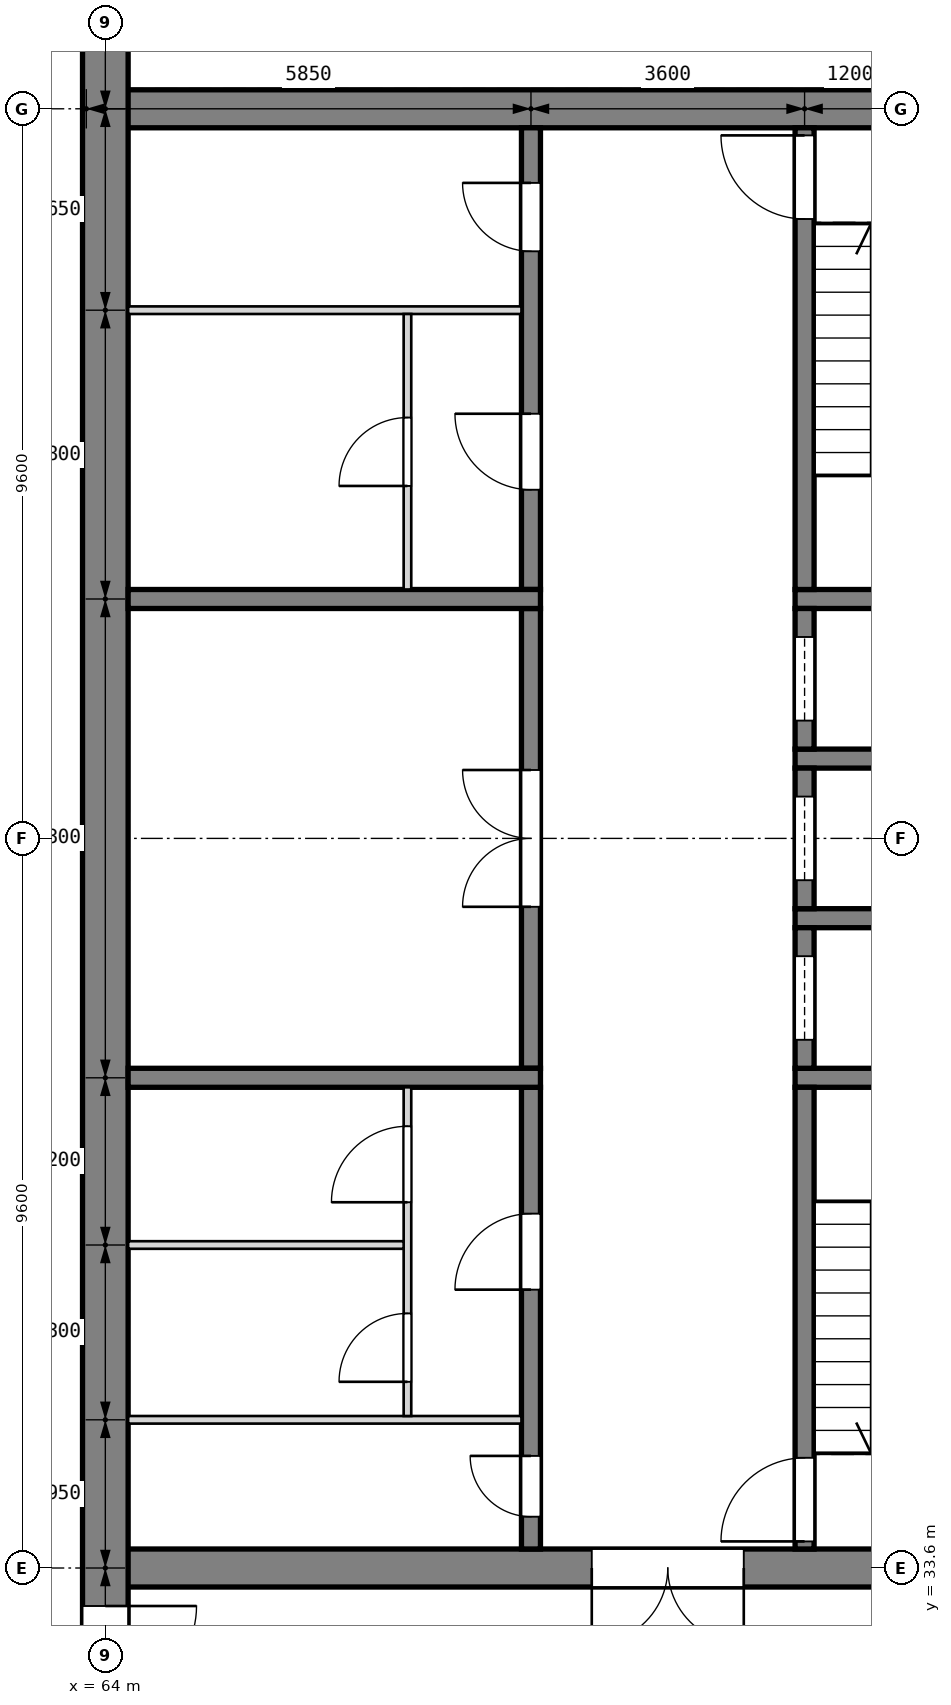
"""IFC4 building model, lengths in metres.
Left out: names, types, materials, properties, quantities, classifications, styles, units other than length and angle.
Written with IfcOpenShell. Run it as: python <this file> out.ifc"""

import sys

from ifc_helpers import new_model, si_unit, direction, frame, frame_2d, origin, place, context, subcontext, project, spatial, rectangle, extrude, element, fill, save


model = new_model("IFC4")
c1 = context("Model", 3, precision=1e-05, world=origin(), true_north=direction((0.0, 1.0)))
c2 = subcontext(c1, "Body", "Model", "MODEL_VIEW")
j1 = project(units=[si_unit("LENGTHUNIT", "METRE"), si_unit("PLANEANGLEUNIT", "RADIAN")], contexts=[c1])
p1 = place(None, origin())
s1 = spatial("IfcSite", under=j1, at=p1, CompositionType="ELEMENT")
p2 = place(p1, origin())
s2 = spatial("IfcBuilding", under=s1, at=p2, CompositionType="ELEMENT")
p3 = place(p2, origin())
s3 = spatial("IfcBuildingStorey", under=s2, at=p3, CompositionType="ELEMENT", Elevation=0.0)
p4 = place(p3, frame((63.75, 52.8, 0.0), z_axis=(0.0, 0.0, 1.0), x_axis=(1.0, 0.0, 0.0)))
e1 = element("IfcWall", 1, at=p4, inside=s3, PredefinedType="SHEAR", context=c2, shape_type="SweptSolid", body=[
    extrude(rectangle(XDim=13.3, YDim=0.5, at=frame_2d((6.65, 0.0))), origin(), (0.0, 0.0, 1.0), 4.2),
])
p5 = place(p4, frame((10.95, 0.0, 0.0)))
e2 = element("IfcOpeningElement", 2, at=p5, cuts=e1, PredefinedType="OPENING", context=c2, shape_type="SweptSolid", body=[
    extrude(rectangle(XDim=1.8, YDim=2.1, at=frame_2d((0.9, 1.05))), frame((0.0, 0.26, 0.0), z_axis=(0.0, -1.0, 0.0), x_axis=(1.0, 0.0, 0.0)), (0.0, 0.0, 1.0), 0.52),
])
p6 = place(p3, frame((63.75, 33.6, 0.0), z_axis=(0.0, 0.0, 1.0), x_axis=(1.0, 0.0, 0.0)))
e3 = element("IfcWall", 3, at=p6, inside=s3, PredefinedType="SHEAR", context=c2, shape_type="SweptSolid", body=[
    extrude(rectangle(XDim=13.3, YDim=0.5, at=frame_2d((6.65, 0.0))), origin(), (0.0, 0.0, 1.0), 4.2),
])
p7 = place(p6, frame((6.65, 0.0, 0.0)))
e4 = element("IfcOpeningElement", 4, at=p7, cuts=e3, PredefinedType="OPENING", context=c2, shape_type="SweptSolid", body=[
    extrude(rectangle(XDim=2.0, YDim=2.1, at=frame_2d((1.0, 1.05))), frame((0.0, 0.26, 0.0), z_axis=(0.0, -1.0, 0.0), x_axis=(1.0, 0.0, 0.0)), (0.0, 0.0, 1.0), 0.52),
])
p8 = place(p6, frame((10.95, 0.0, 0.0)))
e5 = element("IfcOpeningElement", 5, at=p8, cuts=e3, PredefinedType="OPENING", context=c2, shape_type="SweptSolid", body=[
    extrude(rectangle(XDim=1.8, YDim=2.1, at=frame_2d((0.9, 1.05))), frame((0.0, 0.26, 0.0), z_axis=(0.0, -1.0, 0.0), x_axis=(1.0, 0.0, 0.0)), (0.0, 0.0, 1.0), 0.52),
])
p9 = place(p3, frame((64.0, 28.8, 0.0), z_axis=(0.0, 0.0, 1.0), x_axis=(0.0, 1.0, 0.0)))
e6 = element("IfcWall", 6, at=p9, inside=s3, PredefinedType="SHEAR", context=c2, shape_type="SweptSolid", body=[
    extrude(rectangle(XDim=28.8, YDim=0.6, at=frame_2d((14.4, 0.0))), origin(), (0.0, 0.0, 1.0), 4.2),
])
p10 = place(p9, frame((0.5, 0.0, 0.0)))
e7 = element("IfcOpeningElement", 7, at=p10, cuts=e6, PredefinedType="OPENING", context=c2, shape_type="SweptSolid", body=[
    extrude(rectangle(XDim=1.2, YDim=2.1, at=frame_2d((0.6, 1.05))), frame((0.0, 0.31, 0.0), z_axis=(0.0, -1.0, 0.0), x_axis=(1.0, 0.0, 0.0)), (0.0, 0.0, 1.0), 0.62),
])
p11 = place(p9, frame((3.1, 0.0, 0.0)))
e8 = element("IfcOpeningElement", 8, at=p11, cuts=e6, PredefinedType="OPENING", context=c2, shape_type="SweptSolid", body=[
    extrude(rectangle(XDim=1.2, YDim=2.1, at=frame_2d((0.6, 1.05))), frame((0.0, 0.31, 0.0), z_axis=(0.0, -1.0, 0.0), x_axis=(1.0, 0.0, 0.0)), (0.0, 0.0, 1.0), 0.62),
])
for number, where, z_axis, x_axis in (
    (9, (76.55, 40.05, 0.0), (0.0, 0.0, 1.0), (-1.0, 0.0, 0.0)),
    (10, (76.55, 42.15, 0.0), (0.0, 0.0, 1.0), (-1.0, 0.0, 0.0)),
    (11, (76.55, 44.25, 0.0), (0.0, 0.0, 1.0), (-1.0, 0.0, 0.0)),
    (12, (76.55, 46.35, 0.0), (0.0, 0.0, 1.0), (-1.0, 0.0, 0.0)),
):
    element("IfcWall", number, at=place(p3, frame(where, z_axis=z_axis, x_axis=x_axis)), inside=s3, PredefinedType="SOLIDWALL", context=c2, shape_type="SweptSolid", body=[
        extrude(rectangle(XDim=3.475, YDim=0.25, at=frame_2d((1.738, 0.0))), origin(), (0.0, 0.0, 1.0), 3.9),
    ])
p12 = place(p3, frame((73.2, 33.85, 0.0), z_axis=(0.0, 0.0, 1.0), x_axis=(0.0, 1.0, 0.0)))
e13 = element("IfcWall", 13, at=p12, inside=s3, PredefinedType="SOLIDWALL", context=c2, shape_type="SweptSolid", body=[
    extrude(rectangle(XDim=6.075, YDim=0.25, at=frame_2d((3.038, 0.0))), origin(), (0.0, 0.0, 1.0), 3.9),
])
p13 = place(p12, frame((0.1, 0.0, 0.0)))
e14 = element("IfcOpeningElement", 14, at=p13, cuts=e13, PredefinedType="OPENING", context=c2, shape_type="SweptSolid", body=[
    extrude(rectangle(XDim=1.1, YDim=2.1, at=frame_2d((0.55, 1.05))), frame((0.0, 0.135, 0.0), z_axis=(0.0, -1.0, 0.0), x_axis=(1.0, 0.0, 0.0)), (0.0, 0.0, 1.0), 0.27),
])
p14 = place(p3, frame((73.2, 40.175, 0.0), z_axis=(0.0, 0.0, 1.0), x_axis=(0.0, 1.0, 0.0)))
e15 = element("IfcWall", 15, at=p14, inside=s3, PredefinedType="SOLIDWALL", context=c2, shape_type="SweptSolid", body=[
    extrude(rectangle(XDim=1.85, YDim=0.25, at=frame_2d((0.925, 0.0))), origin(), (0.0, 0.0, 1.0), 3.9),
])
p15 = place(p14, frame((0.375, 0.0, 0.0)))
e16 = element("IfcOpeningElement", 16, at=p15, cuts=e15, PredefinedType="OPENING", context=c2, shape_type="SweptSolid", body=[
    extrude(rectangle(XDim=1.1, YDim=2.1, at=frame_2d((0.55, 1.05))), frame((0.0, 0.135, 0.0), z_axis=(0.0, -1.0, 0.0), x_axis=(1.0, 0.0, 0.0)), (0.0, 0.0, 1.0), 0.27),
])
p16 = place(p3, frame((73.2, 42.275, 0.0), z_axis=(0.0, 0.0, 1.0), x_axis=(0.0, 1.0, 0.0)))
e17 = element("IfcWall", 17, at=p16, inside=s3, PredefinedType="SOLIDWALL", context=c2, shape_type="SweptSolid", body=[
    extrude(rectangle(XDim=1.85, YDim=0.25, at=frame_2d((0.925, 0.0))), origin(), (0.0, 0.0, 1.0), 3.9),
])
p17 = place(p16, frame((0.375, 0.0, 0.0)))
e18 = element("IfcOpeningElement", 18, at=p17, cuts=e17, PredefinedType="OPENING", context=c2, shape_type="SweptSolid", body=[
    extrude(rectangle(XDim=1.1, YDim=2.1, at=frame_2d((0.55, 1.05))), frame((0.0, 0.135, 0.0), z_axis=(0.0, -1.0, 0.0), x_axis=(1.0, 0.0, 0.0)), (0.0, 0.0, 1.0), 0.27),
])
p18 = place(p3, frame((73.2, 44.375, 0.0), z_axis=(0.0, 0.0, 1.0), x_axis=(0.0, 1.0, 0.0)))
e19 = element("IfcWall", 19, at=p18, inside=s3, PredefinedType="SOLIDWALL", context=c2, shape_type="SweptSolid", body=[
    extrude(rectangle(XDim=1.85, YDim=0.25, at=frame_2d((0.925, 0.0))), origin(), (0.0, 0.0, 1.0), 3.9),
])
p19 = place(p18, frame((0.375, 0.0, 0.0)))
e20 = element("IfcOpeningElement", 20, at=p19, cuts=e19, PredefinedType="OPENING", context=c2, shape_type="SweptSolid", body=[
    extrude(rectangle(XDim=1.1, YDim=2.1, at=frame_2d((0.55, 1.05))), frame((0.0, 0.135, 0.0), z_axis=(0.0, -1.0, 0.0), x_axis=(1.0, 0.0, 0.0)), (0.0, 0.0, 1.0), 0.27),
])
p20 = place(p3, frame((73.2, 46.475, 0.0), z_axis=(0.0, 0.0, 1.0), x_axis=(0.0, 1.0, 0.0)))
e21 = element("IfcWall", 21, at=p20, inside=s3, PredefinedType="SOLIDWALL", context=c2, shape_type="SweptSolid", body=[
    extrude(rectangle(XDim=6.075, YDim=0.25, at=frame_2d((3.038, 0.0))), origin(), (0.0, 0.0, 1.0), 3.9),
])
p21 = place(p20, frame((4.875, 0.0, 0.0)))
e22 = element("IfcOpeningElement", 22, at=p21, cuts=e21, PredefinedType="OPENING", context=c2, shape_type="SweptSolid", body=[
    extrude(rectangle(XDim=1.1, YDim=2.1, at=frame_2d((0.55, 1.05))), frame((0.0, 0.135, 0.0), z_axis=(0.0, -1.0, 0.0), x_axis=(1.0, 0.0, 0.0)), (0.0, 0.0, 1.0), 0.27),
])
p22 = place(p3, frame((69.6, 33.85, 0.0), z_axis=(0.0, 0.0, 1.0), x_axis=(0.0, 1.0, 0.0)))
e23 = element("IfcWall", 23, at=p22, inside=s3, PredefinedType="SOLIDWALL", context=c2, shape_type="SweptSolid", body=[
    extrude(rectangle(XDim=6.075, YDim=0.25, at=frame_2d((3.038, 0.0))), origin(), (0.0, 0.0, 1.0), 3.9),
])
p23 = place(p22, frame((0.425, 0.0, 0.0)))
e24 = element("IfcOpeningElement", 24, at=p23, cuts=e23, PredefinedType="OPENING", context=c2, shape_type="SweptSolid", body=[
    extrude(rectangle(XDim=0.8, YDim=2.1, at=frame_2d((0.4, 1.05))), frame((0.0, 0.135, 0.0), z_axis=(0.0, -1.0, 0.0), x_axis=(1.0, 0.0, 0.0)), (0.0, 0.0, 1.0), 0.27),
])
p24 = place(p22, frame((3.413, 0.0, 0.0)))
e25 = element("IfcOpeningElement", 25, at=p24, cuts=e23, PredefinedType="OPENING", context=c2, shape_type="SweptSolid", body=[
    extrude(rectangle(XDim=1.0, YDim=2.1, at=frame_2d((0.5, 1.05))), frame((0.0, 0.135, 0.0), z_axis=(0.0, -1.0, 0.0), x_axis=(1.0, 0.0, 0.0)), (0.0, 0.0, 1.0), 0.27),
])
p25 = place(p3, frame((69.6, 40.175, 0.0), z_axis=(0.0, 0.0, 1.0), x_axis=(0.0, 1.0, 0.0)))
e26 = element("IfcWall", 26, at=p25, inside=s3, PredefinedType="SOLIDWALL", context=c2, shape_type="SweptSolid", body=[
    extrude(rectangle(XDim=6.05, YDim=0.25, at=frame_2d((3.025, 0.0))), origin(), (0.0, 0.0, 1.0), 3.9),
])
p26 = place(p25, frame((2.125, 0.0, 0.0)))
e27 = element("IfcOpeningElement", 27, at=p26, cuts=e26, PredefinedType="OPENING", context=c2, shape_type="SweptSolid", body=[
    extrude(rectangle(XDim=1.8, YDim=2.1, at=frame_2d((0.9, 1.05))), frame((0.0, 0.135, 0.0), z_axis=(0.0, -1.0, 0.0), x_axis=(1.0, 0.0, 0.0)), (0.0, 0.0, 1.0), 0.27),
])
p27 = place(p3, frame((69.6, 46.475, 0.0), z_axis=(0.0, 0.0, 1.0), x_axis=(0.0, 1.0, 0.0)))
e28 = element("IfcWall", 28, at=p27, inside=s3, PredefinedType="SOLIDWALL", context=c2, shape_type="SweptSolid", body=[
    extrude(rectangle(XDim=6.075, YDim=0.25, at=frame_2d((3.038, 0.0))), origin(), (0.0, 0.0, 1.0), 3.9),
])
p28 = place(p27, frame((1.312, 0.0, 0.0)))
e29 = element("IfcOpeningElement", 29, at=p28, cuts=e28, PredefinedType="OPENING", context=c2, shape_type="SweptSolid", body=[
    extrude(rectangle(XDim=1.0, YDim=2.1, at=frame_2d((0.5, 1.05))), frame((0.0, 0.135, 0.0), z_axis=(0.0, -1.0, 0.0), x_axis=(1.0, 0.0, 0.0)), (0.0, 0.0, 1.0), 0.27),
])
p29 = place(p27, frame((4.45, 0.0, 0.0)))
e30 = element("IfcOpeningElement", 30, at=p29, cuts=e28, PredefinedType="OPENING", context=c2, shape_type="SweptSolid", body=[
    extrude(rectangle(XDim=0.9, YDim=2.1, at=frame_2d((0.45, 1.05))), frame((0.0, 0.135, 0.0), z_axis=(0.0, -1.0, 0.0), x_axis=(1.0, 0.0, 0.0)), (0.0, 0.0, 1.0), 0.27),
])
for number, where, z_axis, x_axis in (
    (31, (69.725, 40.05, 0.0), (0.0, 0.0, 1.0), (-1.0, 0.0, 0.0)),
    (32, (69.725, 46.35, 0.0), (0.0, 0.0, 1.0), (-1.0, 0.0, 0.0)),
):
    element("IfcWall", number, at=place(p3, frame(where, z_axis=z_axis, x_axis=x_axis)), inside=s3, PredefinedType="SOLIDWALL", context=c2, shape_type="SweptSolid", body=[
        extrude(rectangle(XDim=5.425, YDim=0.25, at=frame_2d((2.712, 0.0))), origin(), (0.0, 0.0, 1.0), 3.9),
    ])
p30 = place(p3, frame((69.475, 35.55, 0.0), z_axis=(0.0, 0.0, 1.0), x_axis=(-1.0, 0.0, 0.0)))
e33 = element("IfcWall", 33, at=p30, inside=s3, PredefinedType="PARTITIONING", context=c2, shape_type="SweptSolid", body=[
    extrude(rectangle(XDim=5.175, YDim=0.1, at=frame_2d((2.587, 0.0))), origin(), (0.0, 0.0, 1.0), 3.9),
])
p31 = place(p3, frame((67.975, 35.6, 0.0), z_axis=(0.0, 0.0, 1.0), x_axis=(0.0, 1.0, 0.0)))
e34 = element("IfcWall", 34, at=p31, inside=s3, PredefinedType="PARTITIONING", context=c2, shape_type="SweptSolid", body=[
    extrude(rectangle(XDim=4.325, YDim=0.1, at=frame_2d((2.163, 0.0))), origin(), (0.0, 0.0, 1.0), 3.9),
])
p32 = place(p31, frame((0.45, 0.0, 0.0)))
e35 = element("IfcOpeningElement", 35, at=p32, cuts=e34, PredefinedType="OPENING", context=c2, shape_type="SweptSolid", body=[
    extrude(rectangle(XDim=0.9, YDim=2.1, at=frame_2d((0.45, 1.05))), frame((0.0, 0.06, 0.0), z_axis=(0.0, -1.0, 0.0), x_axis=(1.0, 0.0, 0.0)), (0.0, 0.0, 1.0), 0.12),
])
p33 = place(p31, frame((2.812, 0.0, 0.0)))
e36 = element("IfcOpeningElement", 36, at=p33, cuts=e34, PredefinedType="OPENING", context=c2, shape_type="SweptSolid", body=[
    extrude(rectangle(XDim=1.0, YDim=2.1, at=frame_2d((0.5, 1.05))), frame((0.0, 0.06, 0.0), z_axis=(0.0, -1.0, 0.0), x_axis=(1.0, 0.0, 0.0)), (0.0, 0.0, 1.0), 0.12),
])
p34 = place(p3, frame((67.925, 37.85, 0.0), z_axis=(0.0, 0.0, 1.0), x_axis=(-1.0, 0.0, 0.0)))
e37 = element("IfcWall", 37, at=p34, inside=s3, PredefinedType="PARTITIONING", context=c2, shape_type="SweptSolid", body=[
    extrude(rectangle(XDim=3.625, YDim=0.1, at=frame_2d((1.812, 0.0))), origin(), (0.0, 0.0, 1.0), 3.9),
])
p35 = place(p3, frame((69.475, 50.15, 0.0), z_axis=(0.0, 0.0, 1.0), x_axis=(-1.0, 0.0, 0.0)))
e38 = element("IfcWall", 38, at=p35, inside=s3, PredefinedType="PARTITIONING", context=c2, shape_type="SweptSolid", body=[
    extrude(rectangle(XDim=5.175, YDim=0.1, at=frame_2d((2.587, 0.0))), origin(), (0.0, 0.0, 1.0), 3.9),
])
p36 = place(p3, frame((67.975, 46.475, 0.0), z_axis=(0.0, 0.0, 1.0), x_axis=(0.0, 1.0, 0.0)))
e39 = element("IfcWall", 39, at=p36, inside=s3, PredefinedType="PARTITIONING", context=c2, shape_type="SweptSolid", body=[
    extrude(rectangle(XDim=3.625, YDim=0.1, at=frame_2d((1.812, 0.0))), origin(), (0.0, 0.0, 1.0), 3.9),
])
p37 = place(p36, frame((1.363, 0.0, 0.0)))
e40 = element("IfcOpeningElement", 40, at=p37, cuts=e39, PredefinedType="OPENING", context=c2, shape_type="SweptSolid", body=[
    extrude(rectangle(XDim=0.9, YDim=2.1, at=frame_2d((0.45, 1.05))), frame((0.0, 0.06, 0.0), z_axis=(0.0, -1.0, 0.0), x_axis=(1.0, 0.0, 0.0)), (0.0, 0.0, 1.0), 0.12),
])
p38 = place(p13, origin())
e41 = element("IfcDoor", 41, at=p38, inside=s3, OperationType="SINGLE_SWING_LEFT", PredefinedType="DOOR", context=c2, shape_type="SweptSolid", body=[
    extrude(rectangle(XDim=1.1, YDim=2.1, at=frame_2d((0.55, 1.05))), frame((0.0, 0.025, 0.0), z_axis=(0.0, -1.0, 0.0), x_axis=(1.0, 0.0, 0.0)), (0.0, 0.0, 1.0), 0.05),
])
fill(e14, e41)
p39 = place(p21, origin())
e42 = element("IfcDoor", 42, at=p39, inside=s3, OperationType="SINGLE_SWING_RIGHT", PredefinedType="DOOR", context=c2, shape_type="SweptSolid", body=[
    extrude(rectangle(XDim=1.1, YDim=2.1, at=frame_2d((0.55, 1.05))), frame((0.0, 0.025, 0.0), z_axis=(0.0, -1.0, 0.0), x_axis=(1.0, 0.0, 0.0)), (0.0, 0.0, 1.0), 0.05),
])
fill(e22, e42)
p40 = place(p15, origin())
e43 = element("IfcDoor", 43, at=p40, inside=s3, OperationType="SLIDING_TO_LEFT", PredefinedType="DOOR", context=c2, shape_type="SweptSolid", body=[
    extrude(rectangle(XDim=1.1, YDim=2.1, at=frame_2d((0.55, 1.05))), frame((0.0, 0.025, 0.0), z_axis=(0.0, -1.0, 0.0), x_axis=(1.0, 0.0, 0.0)), (0.0, 0.0, 1.0), 0.05),
])
fill(e16, e43)
p41 = place(p17, origin())
e44 = element("IfcDoor", 44, at=p41, inside=s3, OperationType="SLIDING_TO_LEFT", PredefinedType="DOOR", context=c2, shape_type="SweptSolid", body=[
    extrude(rectangle(XDim=1.1, YDim=2.1, at=frame_2d((0.55, 1.05))), frame((0.0, 0.025, 0.0), z_axis=(0.0, -1.0, 0.0), x_axis=(1.0, 0.0, 0.0)), (0.0, 0.0, 1.0), 0.05),
])
fill(e18, e44)
p42 = place(p19, origin())
e45 = element("IfcDoor", 45, at=p42, inside=s3, OperationType="SLIDING_TO_LEFT", PredefinedType="DOOR", context=c2, shape_type="SweptSolid", body=[
    extrude(rectangle(XDim=1.1, YDim=2.1, at=frame_2d((0.55, 1.05))), frame((0.0, 0.025, 0.0), z_axis=(0.0, -1.0, 0.0), x_axis=(1.0, 0.0, 0.0)), (0.0, 0.0, 1.0), 0.05),
])
fill(e20, e45)
p43 = place(p26, origin())
e46 = element("IfcDoor", 46, at=p43, inside=s3, OperationType="DOUBLE_DOOR_SINGLE_SWING", PredefinedType="DOOR", context=c2, shape_type="SweptSolid", body=[
    extrude(rectangle(XDim=1.8, YDim=2.1, at=frame_2d((0.9, 1.05))), frame((0.0, 0.025, 0.0), z_axis=(0.0, -1.0, 0.0), x_axis=(1.0, 0.0, 0.0)), (0.0, 0.0, 1.0), 0.05),
])
fill(e27, e46)
p44 = place(p23, origin())
e47 = element("IfcDoor", 47, at=p44, inside=s3, OperationType="SINGLE_SWING_RIGHT", PredefinedType="DOOR", context=c2, shape_type="SweptSolid", body=[
    extrude(rectangle(XDim=0.8, YDim=2.1, at=frame_2d((0.4, 1.05))), frame((0.0, 0.025, 0.0), z_axis=(0.0, -1.0, 0.0), x_axis=(1.0, 0.0, 0.0)), (0.0, 0.0, 1.0), 0.05),
])
fill(e24, e47)
p45 = place(p24, origin())
e48 = element("IfcDoor", 48, at=p45, inside=s3, OperationType="SINGLE_SWING_LEFT", PredefinedType="DOOR", context=c2, shape_type="SweptSolid", body=[
    extrude(rectangle(XDim=1.0, YDim=2.1, at=frame_2d((0.5, 1.05))), frame((0.0, 0.025, 0.0), z_axis=(0.0, -1.0, 0.0), x_axis=(1.0, 0.0, 0.0)), (0.0, 0.0, 1.0), 0.05),
])
fill(e25, e48)
p46 = place(p32, origin())
e49 = element("IfcDoor", 49, at=p46, inside=s3, OperationType="SINGLE_SWING_LEFT", PredefinedType="DOOR", context=c2, shape_type="SweptSolid", body=[
    extrude(rectangle(XDim=0.9, YDim=2.1, at=frame_2d((0.45, 1.05))), frame((0.0, 0.025, 0.0), z_axis=(0.0, -1.0, 0.0), x_axis=(1.0, 0.0, 0.0)), (0.0, 0.0, 1.0), 0.05),
])
fill(e35, e49)
p47 = place(p33, origin())
e50 = element("IfcDoor", 50, at=p47, inside=s3, OperationType="SINGLE_SWING_LEFT", PredefinedType="DOOR", context=c2, shape_type="SweptSolid", body=[
    extrude(rectangle(XDim=1.0, YDim=2.1, at=frame_2d((0.5, 1.05))), frame((0.0, 0.025, 0.0), z_axis=(0.0, -1.0, 0.0), x_axis=(1.0, 0.0, 0.0)), (0.0, 0.0, 1.0), 0.05),
])
fill(e36, e50)
p48 = place(p28, origin())
e51 = element("IfcDoor", 51, at=p48, inside=s3, OperationType="SINGLE_SWING_RIGHT", PredefinedType="DOOR", context=c2, shape_type="SweptSolid", body=[
    extrude(rectangle(XDim=1.0, YDim=2.1, at=frame_2d((0.5, 1.05))), frame((0.0, 0.025, 0.0), z_axis=(0.0, -1.0, 0.0), x_axis=(1.0, 0.0, 0.0)), (0.0, 0.0, 1.0), 0.05),
])
fill(e29, e51)
p49 = place(p37, origin())
e52 = element("IfcDoor", 52, at=p49, inside=s3, OperationType="SINGLE_SWING_LEFT", PredefinedType="DOOR", context=c2, shape_type="SweptSolid", body=[
    extrude(rectangle(XDim=0.9, YDim=2.1, at=frame_2d((0.45, 1.05))), frame((0.0, 0.025, 0.0), z_axis=(0.0, -1.0, 0.0), x_axis=(1.0, 0.0, 0.0)), (0.0, 0.0, 1.0), 0.05),
])
fill(e40, e52)
p50 = place(p29, origin())
e53 = element("IfcDoor", 53, at=p50, inside=s3, OperationType="SINGLE_SWING_RIGHT", PredefinedType="DOOR", context=c2, shape_type="SweptSolid", body=[
    extrude(rectangle(XDim=0.9, YDim=2.1, at=frame_2d((0.45, 1.05))), frame((0.0, 0.025, 0.0), z_axis=(0.0, -1.0, 0.0), x_axis=(1.0, 0.0, 0.0)), (0.0, 0.0, 1.0), 0.05),
])
fill(e30, e53)
p51 = place(p7, frame((2.0, 0.0, 0.0), z_axis=(0.0, 0.0, 1.0), x_axis=(-1.0, 0.0, 0.0)))
e54 = element("IfcDoor", 54, at=p51, inside=s3, OperationType="DOUBLE_DOOR_SINGLE_SWING", PredefinedType="DOOR", context=c2, shape_type="SweptSolid", body=[
    extrude(rectangle(XDim=2.0, YDim=2.1, at=frame_2d((1.0, 1.05))), frame((0.0, 0.025, 0.0), z_axis=(0.0, -1.0, 0.0), x_axis=(1.0, 0.0, 0.0)), (0.0, 0.0, 1.0), 0.05),
])
fill(e4, e54)
p52 = place(p11, frame((1.2, 0.0, 0.0), z_axis=(0.0, 0.0, 1.0), x_axis=(-1.0, 0.0, 0.0)))
e55 = element("IfcDoor", 55, at=p52, inside=s3, OperationType="SINGLE_SWING_LEFT", PredefinedType="DOOR", context=c2, shape_type="SweptSolid", body=[
    extrude(rectangle(XDim=1.2, YDim=2.1, at=frame_2d((0.6, 1.05))), frame((0.0, 0.025, 0.0), z_axis=(0.0, -1.0, 0.0), x_axis=(1.0, 0.0, 0.0)), (0.0, 0.0, 1.0), 0.05),
])
fill(e8, e55)
save(model, sys.argv[1])
